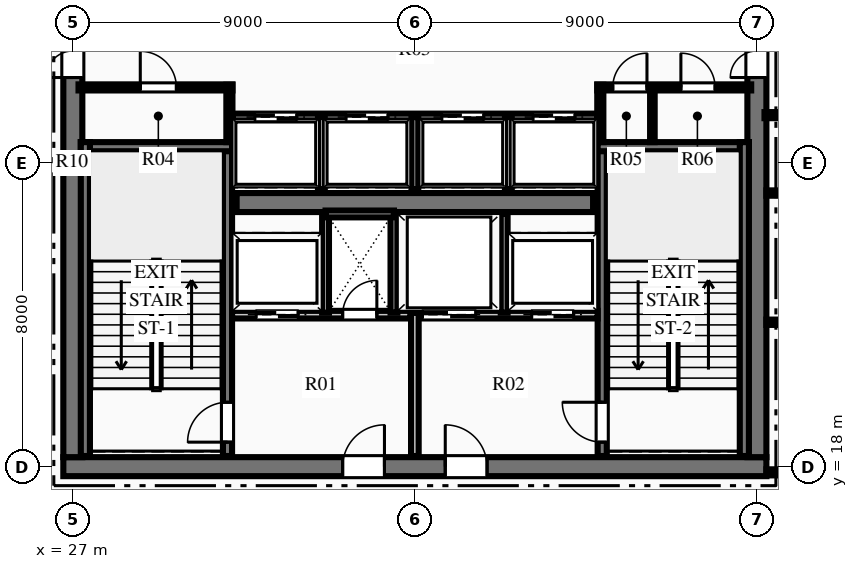
"""IFC4 building model, lengths in metres.
Left out: names, types, materials, properties, quantities, classifications, styles, units other than length and angle.
Written with IfcOpenShell. Run it as: python <this file> out.ifc"""

import sys

from ifc_helpers import new_model, si_unit, direction, frame, frame_2d, origin, place, context, subcontext, project, spatial, rectangle, extrude, element, fill, save


model = new_model("IFC4")
c1 = context("Model", 3, precision=1e-05, world=origin(), true_north=direction((0.0, 1.0)))
c2 = subcontext(c1, "Body", "Model", "MODEL_VIEW")
j1 = project(units=[si_unit("LENGTHUNIT", "METRE"), si_unit("PLANEANGLEUNIT", "RADIAN")], contexts=[c1])
p1 = place(None, origin())
s1 = spatial("IfcSite", under=j1, at=p1, CompositionType="ELEMENT")
p2 = place(p1, origin())
s2 = spatial("IfcBuilding", under=s1, at=p2, CompositionType="ELEMENT")
p3 = place(p2, frame((0.0, 0.0, 193.95)))
s3 = spatial("IfcBuildingStorey", under=s2, at=p3, CompositionType="ELEMENT", Elevation=193.95)
p4 = place(p3, frame((26.75, 18.0, 0.0), z_axis=(0.0, 0.0, 1.0), x_axis=(1.0, 0.0, 0.0)))
e1 = element("IfcWall", 1, at=p4, inside=s3, PredefinedType="SHEAR", context=c2, shape_type="SweptSolid", body=[
    extrude(rectangle(XDim=18.5, YDim=0.5, at=frame_2d((9.25, 0.0))), origin(), (0.0, 0.0, 1.0), 4.5),
])
p5 = place(p4, frame((7.35, 0.0, 0.0)))
e2 = element("IfcOpeningElement", 2, at=p5, cuts=e1, PredefinedType="OPENING", context=c2, shape_type="SweptSolid", body=[
    extrude(rectangle(XDim=1.1, YDim=2.15, at=frame_2d((0.55, 1.075))), frame((0.0, 0.26, 0.0), z_axis=(0.0, -1.0, 0.0), x_axis=(1.0, 0.0, 0.0)), (0.0, 0.0, 1.0), 0.52),
])
p6 = place(p4, frame((10.05, 0.0, 0.0)))
e3 = element("IfcOpeningElement", 3, at=p6, cuts=e1, PredefinedType="OPENING", context=c2, shape_type="SweptSolid", body=[
    extrude(rectangle(XDim=1.1, YDim=2.15, at=frame_2d((0.55, 1.075))), frame((0.0, 0.26, 0.0), z_axis=(0.0, -1.0, 0.0), x_axis=(1.0, 0.0, 0.0)), (0.0, 0.0, 1.0), 0.52),
])
p7 = place(p3, frame((27.0, 18.25, 0.0), z_axis=(0.0, 0.0, 1.0), x_axis=(0.0, 1.0, 0.0)))
e4 = element("IfcWall", 4, at=p7, inside=s3, PredefinedType="SHEAR", context=c2, shape_type="SweptSolid", body=[
    extrude(rectangle(XDim=15.5, YDim=0.5, at=frame_2d((7.75, 0.0))), origin(), (0.0, 0.0, 1.0), 4.5),
])
p8 = place(p7, frame((9.99, 0.0, 0.0)))
e5 = element("IfcOpeningElement", 5, at=p8, cuts=e4, PredefinedType="OPENING", context=c2, shape_type="SweptSolid", body=[
    extrude(rectangle(XDim=1.4, YDim=2.2, at=frame_2d((0.7, 1.1))), frame((0.0, 0.26, 0.0), z_axis=(0.0, -1.0, 0.0), x_axis=(1.0, 0.0, 0.0)), (0.0, 0.0, 1.0), 0.52),
])
p9 = place(p3, frame((45.0, 18.25, 0.0), z_axis=(0.0, 0.0, 1.0), x_axis=(0.0, 1.0, 0.0)))
e6 = element("IfcWall", 6, at=p9, inside=s3, PredefinedType="SHEAR", context=c2, shape_type="SweptSolid", body=[
    extrude(rectangle(XDim=15.5, YDim=0.5, at=frame_2d((7.75, 0.0))), origin(), (0.0, 0.0, 1.0), 4.5),
])
p10 = place(p9, frame((9.99, 0.0, 0.0)))
e7 = element("IfcOpeningElement", 7, at=p10, cuts=e6, PredefinedType="OPENING", context=c2, shape_type="SweptSolid", body=[
    extrude(rectangle(XDim=1.4, YDim=2.2, at=frame_2d((0.7, 1.1))), frame((0.0, 0.26, 0.0), z_axis=(0.0, -1.0, 0.0), x_axis=(1.0, 0.0, 0.0)), (0.0, 0.0, 1.0), 0.52),
])
p11 = place(p3, frame((31.31, 24.95, 0.0), z_axis=(0.0, 0.0, 1.0), x_axis=(1.0, 0.0, 0.0)))
e8 = element("IfcWall", 8, at=p11, inside=s3, PredefinedType="SHEAR", context=c2, shape_type="SweptSolid", body=[
    extrude(rectangle(XDim=9.38, YDim=0.5, at=frame_2d((4.69, 0.0))), origin(), (0.0, 0.0, 1.0), 4.5),
])
p12 = place(p3, frame((31.07, 18.28, 0.0), z_axis=(0.0, 0.0, 1.0), x_axis=(0.0, 1.0, 0.0)))
e9 = element("IfcWall", 9, at=p12, inside=s3, PredefinedType="SHEAR", context=c2, shape_type="SweptSolid", body=[
    extrude(rectangle(XDim=8.26, YDim=0.24, at=frame_2d((4.13, 0.0))), origin(), (0.0, 0.0, 1.0), 4.5),
])
p13 = place(p12, frame((0.365, 0.0, 0.0)))
e10 = element("IfcOpeningElement", 10, at=p13, cuts=e9, PredefinedType="OPENING", context=c2, shape_type="SweptSolid", body=[
    extrude(rectangle(XDim=1.05, YDim=2.15, at=frame_2d((0.525, 1.075))), frame((0.0, 0.13, 0.0), z_axis=(0.0, -1.0, 0.0), x_axis=(1.0, 0.0, 0.0)), (0.0, 0.0, 1.0), 0.26),
])
p14 = place(p3, frame((27.21, 26.42, 0.0), z_axis=(0.0, 0.0, 1.0), x_axis=(1.0, 0.0, 0.0)))
e11 = element("IfcWall", 11, at=p14, inside=s3, PredefinedType="SHEAR", context=c2, shape_type="SweptSolid", body=[
    extrude(rectangle(XDim=3.98, YDim=0.24, at=frame_2d((1.99, 0.0))), origin(), (0.0, 0.0, 1.0), 4.5),
])
p15 = place(p3, frame((27.33, 18.28, 0.0), z_axis=(0.0, 0.0, 1.0), x_axis=(0.0, 1.0, 0.0)))
e12 = element("IfcWall", 12, at=p15, inside=s3, PredefinedType="SHEAR", context=c2, shape_type="SweptSolid", body=[
    extrude(rectangle(XDim=8.26, YDim=0.24, at=frame_2d((4.13, 0.0))), origin(), (0.0, 0.0, 1.0), 4.5),
])
p16 = place(p3, frame((40.93, 18.28, 0.0), z_axis=(0.0, 0.0, 1.0), x_axis=(0.0, 1.0, 0.0)))
e13 = element("IfcWall", 13, at=p16, inside=s3, PredefinedType="SHEAR", context=c2, shape_type="SweptSolid", body=[
    extrude(rectangle(XDim=8.26, YDim=0.24, at=frame_2d((4.13, 0.0))), origin(), (0.0, 0.0, 1.0), 4.5),
])
p17 = place(p16, frame((0.365, 0.0, 0.0)))
e14 = element("IfcOpeningElement", 14, at=p17, cuts=e13, PredefinedType="OPENING", context=c2, shape_type="SweptSolid", body=[
    extrude(rectangle(XDim=1.05, YDim=2.15, at=frame_2d((0.525, 1.075))), frame((0.0, 0.13, 0.0), z_axis=(0.0, -1.0, 0.0), x_axis=(1.0, 0.0, 0.0)), (0.0, 0.0, 1.0), 0.26),
])
p18 = place(p3, frame((40.81, 26.42, 0.0), z_axis=(0.0, 0.0, 1.0), x_axis=(1.0, 0.0, 0.0)))
e15 = element("IfcWall", 15, at=p18, inside=s3, PredefinedType="SHEAR", context=c2, shape_type="SweptSolid", body=[
    extrude(rectangle(XDim=3.98, YDim=0.24, at=frame_2d((1.99, 0.0))), origin(), (0.0, 0.0, 1.0), 4.5),
])
p19 = place(p3, frame((44.67, 18.28, 0.0), z_axis=(0.0, 0.0, 1.0), x_axis=(0.0, 1.0, 0.0)))
e16 = element("IfcWall", 16, at=p19, inside=s3, PredefinedType="SHEAR", context=c2, shape_type="SweptSolid", body=[
    extrude(rectangle(XDim=8.26, YDim=0.24, at=frame_2d((4.13, 0.0))), origin(), (0.0, 0.0, 1.0), 4.5),
])
p20 = place(p3, frame((36.0, 18.28, 0.0), z_axis=(0.0, 0.0, 1.0), x_axis=(0.0, 1.0, 0.0)))
e17 = element("IfcWall", 17, at=p20, inside=s3, PredefinedType="PARTITIONING", context=c2, shape_type="SweptSolid", body=[
    extrude(rectangle(XDim=3.77, YDim=0.2, at=frame_2d((1.885, 0.0))), origin(), (0.0, 0.0, 1.0), 4.22),
])
p21 = place(p3, frame((31.19, 22.0, 0.0), z_axis=(0.0, 0.0, 1.0), x_axis=(1.0, 0.0, 0.0)))
e18 = element("IfcWall", 18, at=p21, inside=s3, PredefinedType="PARTITIONING", context=c2, shape_type="SweptSolid", body=[
    extrude(rectangle(XDim=4.69, YDim=0.2, at=frame_2d((2.345, 0.0))), origin(), (0.0, 0.0, 1.0), 4.22),
])
p22 = place(p21, frame((2.91, 0.0, 0.0)))
e19 = element("IfcOpeningElement", 19, at=p22, cuts=e18, PredefinedType="OPENING", context=c2, shape_type="SweptSolid", body=[
    extrude(rectangle(XDim=0.9, YDim=2.15, at=frame_2d((0.45, 1.075))), frame((0.0, 0.11, 0.0), z_axis=(0.0, -1.0, 0.0), x_axis=(1.0, 0.0, 0.0)), (0.0, 0.0, 1.0), 0.22),
])
p23 = place(p21, frame((0.635, 0.0, 0.0)))
e20 = element("IfcOpeningElement", 20, at=p23, cuts=e18, PredefinedType="OPENING", context=c2, shape_type="SweptSolid", body=[
    extrude(rectangle(XDim=1.1, YDim=2.15, at=frame_2d((0.55, 1.075))), frame((0.0, 0.11, 0.0), z_axis=(0.0, -1.0, 0.0), x_axis=(1.0, 0.0, 0.0)), (0.0, 0.0, 1.0), 0.22),
])
p24 = place(p3, frame((36.12, 22.0, 0.0), z_axis=(0.0, 0.0, 1.0), x_axis=(1.0, 0.0, 0.0)))
e21 = element("IfcWall", 21, at=p24, inside=s3, PredefinedType="PARTITIONING", context=c2, shape_type="SweptSolid", body=[
    extrude(rectangle(XDim=4.69, YDim=0.2, at=frame_2d((2.345, 0.0))), origin(), (0.0, 0.0, 1.0), 4.22),
])
p25 = place(p24, frame((2.955, 0.0, 0.0)))
e22 = element("IfcOpeningElement", 22, at=p25, cuts=e21, PredefinedType="OPENING", context=c2, shape_type="SweptSolid", body=[
    extrude(rectangle(XDim=1.1, YDim=2.15, at=frame_2d((0.55, 1.075))), frame((0.0, 0.11, 0.0), z_axis=(0.0, -1.0, 0.0), x_axis=(1.0, 0.0, 0.0)), (0.0, 0.0, 1.0), 0.22),
])
p26 = place(p24, frame((0.08, 0.0, 0.0)))
e23 = element("IfcOpeningElement", 23, at=p26, cuts=e21, PredefinedType="OPENING", context=c2, shape_type="SweptSolid", body=[
    extrude(rectangle(XDim=1.4, YDim=2.2, at=frame_2d((0.7, 1.1))), frame((0.0, 0.11, 0.0), z_axis=(0.0, -1.0, 0.0), x_axis=(1.0, 0.0, 0.0)), (0.0, 0.0, 1.0), 0.22),
])
for number, where, z_axis, x_axis in (
    (24, (33.65, 22.05, 0.0), (0.0, 0.0, 1.0), (0.0, 1.0, 0.0)),
    (25, (35.45, 22.05, 0.0), (0.0, 0.0, 1.0), (0.0, 1.0, 0.0)),
):
    element("IfcWall", number, at=place(p3, frame(where, z_axis=z_axis, x_axis=x_axis)), inside=s3, PredefinedType="PARTITIONING", context=c2, shape_type="SweptSolid", body=[
        extrude(rectangle(XDim=2.6, YDim=0.18, at=frame_2d((1.3, 0.0))), origin(), (0.0, 0.0, 1.0), 4.22),
    ])
p27 = place(p3, frame((33.65, 24.65, 0.0), z_axis=(0.0, 0.0, 1.0), x_axis=(1.0, 0.0, 0.0)))
e26 = element("IfcWall", 26, at=p27, inside=s3, PredefinedType="PARTITIONING", context=c2, shape_type="SweptSolid", body=[
    extrude(rectangle(XDim=1.8, YDim=0.18, at=frame_2d((0.9, 0.0))), origin(), (0.0, 0.0, 1.0), 4.22),
])
p28 = place(p3, frame((38.35, 22.05, 0.0), z_axis=(0.0, 0.0, 1.0), x_axis=(0.0, 1.0, 0.0)))
e27 = element("IfcWall", 27, at=p28, inside=s3, PredefinedType="PARTITIONING", context=c2, shape_type="SweptSolid", body=[
    extrude(rectangle(XDim=2.6, YDim=0.18, at=frame_2d((1.3, 0.0))), origin(), (0.0, 0.0, 1.0), 4.22),
])
p29 = place(p3, frame((27.15, 27.98, 0.0), z_axis=(0.0, 0.0, 1.0), x_axis=(1.0, 0.0, 0.0)))
e28 = element("IfcWall", 28, at=p29, inside=s3, PredefinedType="PARTITIONING", context=c2, shape_type="SweptSolid", body=[
    extrude(rectangle(XDim=4.05, YDim=0.16, at=frame_2d((2.025, 0.0))), origin(), (0.0, 0.0, 1.0), 4.22),
])
p30 = place(p29, frame((1.625, 0.0, 0.0)))
e29 = element("IfcOpeningElement", 29, at=p30, cuts=e28, PredefinedType="OPENING", context=c2, shape_type="SweptSolid", body=[
    extrude(rectangle(XDim=0.95, YDim=2.15, at=frame_2d((0.475, 1.075))), frame((0.0, 0.09, 0.0), z_axis=(0.0, -1.0, 0.0), x_axis=(1.0, 0.0, 0.0)), (0.0, 0.0, 1.0), 0.18),
])
p31 = place(p3, frame((31.12, 26.54, 0.0), z_axis=(0.0, 0.0, 1.0), x_axis=(0.0, 1.0, 0.0)))
e30 = element("IfcWall", 30, at=p31, inside=s3, PredefinedType="PARTITIONING", context=c2, shape_type="SweptSolid", body=[
    extrude(rectangle(XDim=1.51, YDim=0.16, at=frame_2d((0.755, 0.0))), origin(), (0.0, 0.0, 1.0), 4.22),
])
p32 = place(p3, frame((40.8, 27.98, 0.0), z_axis=(0.0, 0.0, 1.0), x_axis=(1.0, 0.0, 0.0)))
e31 = element("IfcWall", 31, at=p32, inside=s3, PredefinedType="PARTITIONING", context=c2, shape_type="SweptSolid", body=[
    extrude(rectangle(XDim=4.05, YDim=0.16, at=frame_2d((2.025, 0.0))), origin(), (0.0, 0.0, 1.0), 4.22),
])
p33 = place(p32, frame((0.407, 0.0, 0.0)))
e32 = element("IfcOpeningElement", 32, at=p33, cuts=e31, PredefinedType="OPENING", context=c2, shape_type="SweptSolid", body=[
    extrude(rectangle(XDim=0.9, YDim=2.15, at=frame_2d((0.45, 1.075))), frame((0.0, 0.09, 0.0), z_axis=(0.0, -1.0, 0.0), x_axis=(1.0, 0.0, 0.0)), (0.0, 0.0, 1.0), 0.18),
])
p34 = place(p32, frame((2.2, 0.0, 0.0)))
e33 = element("IfcOpeningElement", 33, at=p34, cuts=e31, PredefinedType="OPENING", context=c2, shape_type="SweptSolid", body=[
    extrude(rectangle(XDim=0.9, YDim=2.15, at=frame_2d((0.45, 1.075))), frame((0.0, 0.09, 0.0), z_axis=(0.0, -1.0, 0.0), x_axis=(1.0, 0.0, 0.0)), (0.0, 0.0, 1.0), 0.18),
])
p35 = place(p3, frame((40.88, 26.54, 0.0), z_axis=(0.0, 0.0, 1.0), x_axis=(0.0, 1.0, 0.0)))
e34 = element("IfcWall", 34, at=p35, inside=s3, PredefinedType="PARTITIONING", context=c2, shape_type="SweptSolid", body=[
    extrude(rectangle(XDim=1.51, YDim=0.16, at=frame_2d((0.755, 0.0))), origin(), (0.0, 0.0, 1.0), 4.22),
])
p36 = place(p3, frame((42.25, 26.54, 0.0), z_axis=(0.0, 0.0, 1.0), x_axis=(0.0, 1.0, 0.0)))
e35 = element("IfcWall", 35, at=p36, inside=s3, PredefinedType="PARTITIONING", context=c2, shape_type="SweptSolid", body=[
    extrude(rectangle(XDim=1.44, YDim=0.12, at=frame_2d((0.72, 0.0))), origin(), (0.0, 0.0, 1.0), 4.22),
])
p37 = place(p3, frame((31.2, 27.2, 0.0), z_axis=(0.0, 0.0, 1.0), x_axis=(1.0, 0.0, 0.0)))
e36 = element("IfcWall", 36, at=p37, inside=s3, PredefinedType="PARTITIONING", context=c2, shape_type="SweptSolid", body=[
    extrude(rectangle(XDim=9.6, YDim=0.18, at=frame_2d((4.8, 0.0))), origin(), (0.0, 0.0, 1.0), 4.22),
])
p38 = place(p37, frame((0.59, 0.0, 0.0)))
e37 = element("IfcOpeningElement", 37, at=p38, cuts=e36, PredefinedType="OPENING", context=c2, shape_type="SweptSolid", body=[
    extrude(rectangle(XDim=1.1, YDim=2.15, at=frame_2d((0.55, 1.075))), frame((0.0, 0.1, 0.0), z_axis=(0.0, -1.0, 0.0), x_axis=(1.0, 0.0, 0.0)), (0.0, 0.0, 1.0), 0.2),
])
p39 = place(p37, frame((2.99, 0.0, 0.0)))
e38 = element("IfcOpeningElement", 38, at=p39, cuts=e36, PredefinedType="OPENING", context=c2, shape_type="SweptSolid", body=[
    extrude(rectangle(XDim=1.1, YDim=2.15, at=frame_2d((0.55, 1.075))), frame((0.0, 0.1, 0.0), z_axis=(0.0, -1.0, 0.0), x_axis=(1.0, 0.0, 0.0)), (0.0, 0.0, 1.0), 0.2),
])
p40 = place(p37, frame((5.51, 0.0, 0.0)))
e39 = element("IfcOpeningElement", 39, at=p40, cuts=e36, PredefinedType="OPENING", context=c2, shape_type="SweptSolid", body=[
    extrude(rectangle(XDim=1.1, YDim=2.15, at=frame_2d((0.55, 1.075))), frame((0.0, 0.1, 0.0), z_axis=(0.0, -1.0, 0.0), x_axis=(1.0, 0.0, 0.0)), (0.0, 0.0, 1.0), 0.2),
])
p41 = place(p37, frame((7.91, 0.0, 0.0)))
e40 = element("IfcOpeningElement", 40, at=p41, cuts=e36, PredefinedType="OPENING", context=c2, shape_type="SweptSolid", body=[
    extrude(rectangle(XDim=1.1, YDim=2.15, at=frame_2d((0.55, 1.075))), frame((0.0, 0.1, 0.0), z_axis=(0.0, -1.0, 0.0), x_axis=(1.0, 0.0, 0.0)), (0.0, 0.0, 1.0), 0.2),
])
for number, where, z_axis, x_axis in (
    (41, (33.54, 25.3, 0.0), (0.0, 0.0, 1.0), (0.0, 1.0, 0.0)),
    (42, (36.0, 25.3, 0.0), (0.0, 0.0, 1.0), (0.0, 1.0, 0.0)),
    (43, (38.46, 25.3, 0.0), (0.0, 0.0, 1.0), (0.0, 1.0, 0.0)),
):
    element("IfcWall", number, at=place(p3, frame(where, z_axis=z_axis, x_axis=x_axis)), inside=s3, PredefinedType="PARTITIONING", context=c2, shape_type="SweptSolid", body=[
        extrude(rectangle(XDim=1.9, YDim=0.18, at=frame_2d((0.95, 0.0))), origin(), (0.0, 0.0, 1.0), 4.22),
    ])
p42 = place(p3, frame((45.25, 17.85, 0.0), z_axis=(0.0, 0.0, 1.0), x_axis=(1.0, 0.0, 0.0)))
e44 = element("IfcWall", 44, at=p42, inside=s3, PredefinedType="PARTITIONING", context=c2, shape_type="SweptSolid", body=[
    extrude(rectangle(XDim=8.55, YDim=0.16, at=frame_2d((4.275, 0.0))), origin(), (0.0, 0.0, 1.0), 4.22),
])
p43 = place(p42, frame((2.211, 0.0, 0.0)))
e45 = element("IfcOpeningElement", 45, at=p43, cuts=e44, PredefinedType="OPENING", context=c2, shape_type="SweptSolid", body=[
    extrude(rectangle(XDim=1.05, YDim=2.15, at=frame_2d((0.525, 1.075))), frame((0.0, 0.09, 0.0), z_axis=(0.0, -1.0, 0.0), x_axis=(1.0, 0.0, 0.0)), (0.0, 0.0, 1.0), 0.18),
])
p44 = place(p3, frame((45.2, 27.25, 0.0), z_axis=(0.0, 0.0, 1.0), x_axis=(1.0, 0.0, 0.0)))
e46 = element("IfcWall", 46, at=p44, inside=s3, PredefinedType="PARTITIONING", context=c2, shape_type="SweptSolid", body=[
    extrude(rectangle(XDim=2.25, YDim=0.16, at=frame_2d((1.125, 0.0))), origin(), (0.0, 0.0, 1.0), 4.22),
])
p45 = place(p3, frame((45.25, 21.8, 0.0), z_axis=(0.0, 0.0, 1.0), x_axis=(1.0, 0.0, 0.0)))
e47 = element("IfcWall", 47, at=p45, inside=s3, PredefinedType="PARTITIONING", context=c2, shape_type="SweptSolid", body=[
    extrude(rectangle(XDim=18.031, YDim=0.14, at=frame_2d((9.016, 0.0))), origin(), (0.0, 0.0, 1.0), 4.22),
])
p46 = place(p45, frame((4.722, 0.0, 0.0)))
e48 = element("IfcOpeningElement", 48, at=p46, cuts=e47, PredefinedType="OPENING", context=c2, shape_type="SweptSolid", body=[
    extrude(rectangle(XDim=0.95, YDim=2.15, at=frame_2d((0.475, 1.075))), frame((0.0, 0.08, 0.0), z_axis=(0.0, -1.0, 0.0), x_axis=(1.0, 0.0, 0.0)), (0.0, 0.0, 1.0), 0.16),
])
p47 = place(p3, frame((45.25, 25.2, 0.0), z_axis=(0.0, 0.0, 1.0), x_axis=(1.0, 0.0, 0.0)))
e49 = element("IfcWall", 49, at=p47, inside=s3, PredefinedType="PARTITIONING", context=c2, shape_type="SweptSolid", body=[
    extrude(rectangle(XDim=20.94, YDim=0.14, at=frame_2d((10.47, 0.0))), origin(), (0.0, 0.0, 1.0), 3.758),
])
p48 = place(p30, origin())
e50 = element("IfcDoor", 50, at=p48, inside=s3, OperationType="SINGLE_SWING_LEFT", PredefinedType="DOOR", context=c2, shape_type="SweptSolid", body=[
    extrude(rectangle(XDim=0.95, YDim=2.15, at=frame_2d((0.475, 1.075))), frame((0.0, 0.025, 0.0), z_axis=(0.0, -1.0, 0.0), x_axis=(1.0, 0.0, 0.0)), (0.0, 0.0, 1.0), 0.05),
])
fill(e29, e50)
p49 = place(p33, origin())
e51 = element("IfcDoor", 51, at=p49, inside=s3, OperationType="SINGLE_SWING_RIGHT", PredefinedType="DOOR", context=c2, shape_type="SweptSolid", body=[
    extrude(rectangle(XDim=0.9, YDim=2.15, at=frame_2d((0.45, 1.075))), frame((0.0, 0.025, 0.0), z_axis=(0.0, -1.0, 0.0), x_axis=(1.0, 0.0, 0.0)), (0.0, 0.0, 1.0), 0.05),
])
fill(e32, e51)
p50 = place(p34, origin())
e52 = element("IfcDoor", 52, at=p50, inside=s3, OperationType="SINGLE_SWING_LEFT", PredefinedType="DOOR", context=c2, shape_type="SweptSolid", body=[
    extrude(rectangle(XDim=0.9, YDim=2.15, at=frame_2d((0.45, 1.075))), frame((0.0, 0.025, 0.0), z_axis=(0.0, -1.0, 0.0), x_axis=(1.0, 0.0, 0.0)), (0.0, 0.0, 1.0), 0.05),
])
fill(e33, e52)
p51 = place(p13, origin())
e53 = element("IfcDoor", 53, at=p51, inside=s3, OperationType="SINGLE_SWING_LEFT", PredefinedType="DOOR", context=c2, shape_type="SweptSolid", body=[
    extrude(rectangle(XDim=1.05, YDim=2.15, at=frame_2d((0.525, 1.075))), frame((0.0, 0.025, 0.0), z_axis=(0.0, -1.0, 0.0), x_axis=(1.0, 0.0, 0.0)), (0.0, 0.0, 1.0), 0.05),
])
fill(e10, e53)
p52 = place(p17, origin())
e54 = element("IfcDoor", 54, at=p52, inside=s3, OperationType="SINGLE_SWING_RIGHT", PredefinedType="DOOR", context=c2, shape_type="SweptSolid", body=[
    extrude(rectangle(XDim=1.05, YDim=2.15, at=frame_2d((0.525, 1.075))), frame((0.0, 0.025, 0.0), z_axis=(0.0, -1.0, 0.0), x_axis=(1.0, 0.0, 0.0)), (0.0, 0.0, 1.0), 0.05),
])
fill(e14, e54)
p53 = place(p5, origin())
e55 = element("IfcDoor", 55, at=p53, inside=s3, OperationType="SINGLE_SWING_RIGHT", PredefinedType="DOOR", context=c2, shape_type="SweptSolid", body=[
    extrude(rectangle(XDim=1.1, YDim=2.15, at=frame_2d((0.55, 1.075))), frame((0.0, 0.025, 0.0), z_axis=(0.0, -1.0, 0.0), x_axis=(1.0, 0.0, 0.0)), (0.0, 0.0, 1.0), 0.05),
])
fill(e2, e55)
p54 = place(p6, origin())
e56 = element("IfcDoor", 56, at=p54, inside=s3, OperationType="SINGLE_SWING_LEFT", PredefinedType="DOOR", context=c2, shape_type="SweptSolid", body=[
    extrude(rectangle(XDim=1.1, YDim=2.15, at=frame_2d((0.55, 1.075))), frame((0.0, 0.025, 0.0), z_axis=(0.0, -1.0, 0.0), x_axis=(1.0, 0.0, 0.0)), (0.0, 0.0, 1.0), 0.05),
])
fill(e3, e56)
p55 = place(p22, origin())
e57 = element("IfcDoor", 57, at=p55, inside=s3, OperationType="SINGLE_SWING_RIGHT", PredefinedType="DOOR", context=c2, shape_type="SweptSolid", body=[
    extrude(rectangle(XDim=0.9, YDim=2.15, at=frame_2d((0.45, 1.075))), frame((0.0, 0.025, 0.0), z_axis=(0.0, -1.0, 0.0), x_axis=(1.0, 0.0, 0.0)), (0.0, 0.0, 1.0), 0.05),
])
fill(e19, e57)
p56 = place(p8, origin())
e58 = element("IfcDoor", 58, at=p56, inside=s3, OperationType="DOUBLE_DOOR_SINGLE_SWING", PredefinedType="DOOR", context=c2, shape_type="SweptSolid", body=[
    extrude(rectangle(XDim=1.4, YDim=2.2, at=frame_2d((0.7, 1.1))), frame((0.0, 0.025, 0.0), z_axis=(0.0, -1.0, 0.0), x_axis=(1.0, 0.0, 0.0)), (0.0, 0.0, 1.0), 0.05),
])
fill(e5, e58)
p57 = place(p10, origin())
e59 = element("IfcDoor", 59, at=p57, inside=s3, OperationType="DOUBLE_DOOR_SINGLE_SWING", PredefinedType="DOOR", context=c2, shape_type="SweptSolid", body=[
    extrude(rectangle(XDim=1.4, YDim=2.2, at=frame_2d((0.7, 1.1))), frame((0.0, 0.025, 0.0), z_axis=(0.0, -1.0, 0.0), x_axis=(1.0, 0.0, 0.0)), (0.0, 0.0, 1.0), 0.05),
])
fill(e7, e59)
p58 = place(p38, origin())
e60 = element("IfcDoor", 60, at=p58, inside=s3, OperationType="SLIDING_TO_LEFT", PredefinedType="DOOR", context=c2, shape_type="SweptSolid", body=[
    extrude(rectangle(XDim=1.1, YDim=2.15, at=frame_2d((0.55, 1.075))), frame((0.0, 0.025, 0.0), z_axis=(0.0, -1.0, 0.0), x_axis=(1.0, 0.0, 0.0)), (0.0, 0.0, 1.0), 0.05),
])
fill(e37, e60)
p59 = place(p39, origin())
e61 = element("IfcDoor", 61, at=p59, inside=s3, OperationType="SLIDING_TO_LEFT", PredefinedType="DOOR", context=c2, shape_type="SweptSolid", body=[
    extrude(rectangle(XDim=1.1, YDim=2.15, at=frame_2d((0.55, 1.075))), frame((0.0, 0.025, 0.0), z_axis=(0.0, -1.0, 0.0), x_axis=(1.0, 0.0, 0.0)), (0.0, 0.0, 1.0), 0.05),
])
fill(e38, e61)
p60 = place(p40, origin())
e62 = element("IfcDoor", 62, at=p60, inside=s3, OperationType="SLIDING_TO_LEFT", PredefinedType="DOOR", context=c2, shape_type="SweptSolid", body=[
    extrude(rectangle(XDim=1.1, YDim=2.15, at=frame_2d((0.55, 1.075))), frame((0.0, 0.025, 0.0), z_axis=(0.0, -1.0, 0.0), x_axis=(1.0, 0.0, 0.0)), (0.0, 0.0, 1.0), 0.05),
])
fill(e39, e62)
p61 = place(p41, origin())
e63 = element("IfcDoor", 63, at=p61, inside=s3, OperationType="SLIDING_TO_LEFT", PredefinedType="DOOR", context=c2, shape_type="SweptSolid", body=[
    extrude(rectangle(XDim=1.1, YDim=2.15, at=frame_2d((0.55, 1.075))), frame((0.0, 0.025, 0.0), z_axis=(0.0, -1.0, 0.0), x_axis=(1.0, 0.0, 0.0)), (0.0, 0.0, 1.0), 0.05),
])
fill(e40, e63)
p62 = place(p23, origin())
e64 = element("IfcDoor", 64, at=p62, inside=s3, OperationType="SLIDING_TO_LEFT", PredefinedType="DOOR", context=c2, shape_type="SweptSolid", body=[
    extrude(rectangle(XDim=1.1, YDim=2.15, at=frame_2d((0.55, 1.075))), frame((0.0, 0.025, 0.0), z_axis=(0.0, -1.0, 0.0), x_axis=(1.0, 0.0, 0.0)), (0.0, 0.0, 1.0), 0.05),
])
fill(e20, e64)
p63 = place(p25, origin())
e65 = element("IfcDoor", 65, at=p63, inside=s3, OperationType="SLIDING_TO_LEFT", PredefinedType="DOOR", context=c2, shape_type="SweptSolid", body=[
    extrude(rectangle(XDim=1.1, YDim=2.15, at=frame_2d((0.55, 1.075))), frame((0.0, 0.025, 0.0), z_axis=(0.0, -1.0, 0.0), x_axis=(1.0, 0.0, 0.0)), (0.0, 0.0, 1.0), 0.05),
])
fill(e22, e65)
p64 = place(p26, origin())
e66 = element("IfcDoor", 66, at=p64, inside=s3, OperationType="SLIDING_TO_LEFT", PredefinedType="DOOR", context=c2, shape_type="SweptSolid", body=[
    extrude(rectangle(XDim=1.4, YDim=2.2, at=frame_2d((0.7, 1.1))), frame((0.0, 0.025, 0.0), z_axis=(0.0, -1.0, 0.0), x_axis=(1.0, 0.0, 0.0)), (0.0, 0.0, 1.0), 0.05),
])
fill(e23, e66)
save(model, sys.argv[1])
